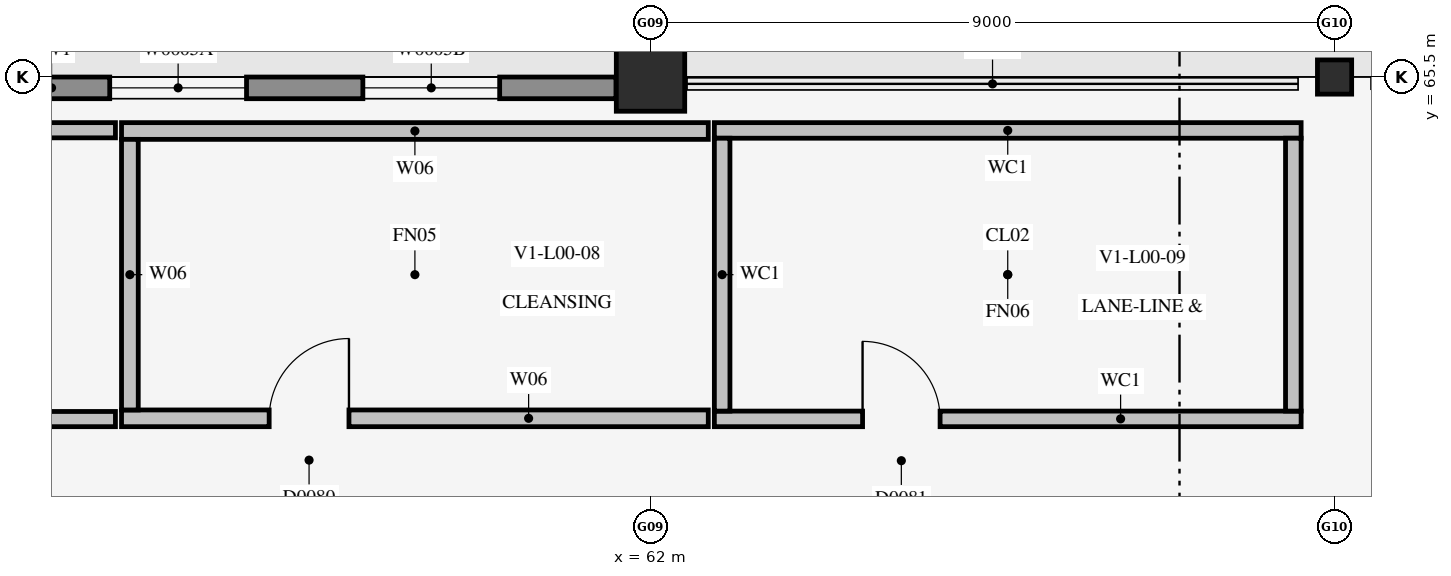
"""IFC4 building model, lengths in metres.
Left out: names, types, materials, properties, quantities, classifications, styles, units other than length and angle.
Written with IfcOpenShell. Run it as: python <this file> out.ifc"""

import sys

from ifc_helpers import new_model, si_unit, direction, frame, frame_2d, origin, origin_2d, place, context, subcontext, project, spatial, rectangle, circle, extrude, element, fill, save


model = new_model("IFC4")
c1 = context("Model", 3, precision=1e-05, world=origin(), true_north=direction((0.0, 1.0)))
c2 = subcontext(c1, "Body", "Model", "MODEL_VIEW")
j1 = project(units=[si_unit("LENGTHUNIT", "METRE"), si_unit("PLANEANGLEUNIT", "RADIAN")], contexts=[c1])
p1 = place(None, origin())
s1 = spatial("IfcSite", under=j1, at=p1, CompositionType="ELEMENT")
p2 = place(p1, origin())
s2 = spatial("IfcBuilding", under=s1, at=p2, CompositionType="ELEMENT")
p3 = place(p2, origin())
s3 = spatial("IfcBuildingStorey", under=s2, at=p3, CompositionType="ELEMENT", Elevation=0.0)
p4 = place(p3, frame((62.0, 65.5, 0.0), z_axis=(0.0, 0.0, 1.0), x_axis=(1.0, 0.0, 0.0)))
e1 = element("IfcColumn", 1, at=p4, inside=s3, PredefinedType="COLUMN", context=c2, shape_type="SweptSolid", body=[
    extrude(circle(Radius=0.45, at=origin_2d()), origin(), (0.0, 0.0, 1.0), 5.4),
])
p5 = place(p3, frame((71.0, 65.5, 0.0), z_axis=(0.0, 0.0, 1.0), x_axis=(1.0, 0.0, 0.0)))
e2 = element("IfcColumn", 2, at=p5, inside=s3, PredefinedType="COLUMN", context=c2, shape_type="SweptSolid", body=[
    extrude(rectangle(XDim=0.45, YDim=0.45, at=origin_2d()), origin(), (0.0, 0.0, 1.0), 5.4),
])
p6 = place(p3, frame((47.24, 61.0, 0.0), z_axis=(0.0, 0.0, 1.0), x_axis=(1.0, 0.0, 0.0)))
e3 = element("IfcWall", 3, at=p6, inside=s3, PredefinedType="PLUMBINGWALL", context=c2, shape_type="SweptSolid", body=[
    extrude(rectangle(XDim=7.72, YDim=0.2, at=frame_2d((3.86, 0.0))), origin(), (0.0, 0.0, 1.0), 5.125),
])
p7 = place(p6, frame((1.93, 0.0, 0.0)))
e4 = element("IfcOpeningElement", 4, at=p7, cuts=e3, PredefinedType="OPENING", context=c2, shape_type="SweptSolid", body=[
    extrude(rectangle(XDim=1.1, YDim=2.25, at=frame_2d((0.55, 1.125))), frame((0.0, 0.112, 0.0), z_axis=(0.0, -1.0, 0.0), x_axis=(1.0, 0.0, 0.0)), (0.0, 0.0, 1.0), 0.224),
])
p8 = place(p3, frame((47.24, 64.8, 0.0), z_axis=(0.0, 0.0, 1.0), x_axis=(1.0, 0.0, 0.0)))
e5 = element("IfcWall", 5, at=p8, inside=s3, PredefinedType="PLUMBINGWALL", context=c2, shape_type="SweptSolid", body=[
    extrude(rectangle(XDim=7.72, YDim=0.2, at=frame_2d((3.86, 0.0))), origin(), (0.0, 0.0, 1.0), 5.125),
])
p9 = place(p3, frame((55.04, 61.01, 0.0), z_axis=(0.0, 0.0, 1.0), x_axis=(1.0, 0.0, 0.0)))
e6 = element("IfcWall", 6, at=p9, inside=s3, PredefinedType="PLUMBINGWALL", context=c2, shape_type="SweptSolid", body=[
    extrude(rectangle(XDim=7.72, YDim=0.22, at=frame_2d((3.86, 0.0))), origin(), (0.0, 0.0, 1.0), 5.125),
])
p10 = place(p9, frame((1.942, 0.0, 0.0)))
e7 = element("IfcOpeningElement", 7, at=p10, cuts=e6, PredefinedType="OPENING", context=c2, shape_type="SweptSolid", body=[
    extrude(rectangle(XDim=1.05, YDim=2.15, at=frame_2d((0.525, 1.075))), frame((0.0, 0.122, 0.0), z_axis=(0.0, -1.0, 0.0), x_axis=(1.0, 0.0, 0.0)), (0.0, 0.0, 1.0), 0.244),
])
p11 = place(p3, frame((55.04, 64.79, 0.0), z_axis=(0.0, 0.0, 1.0), x_axis=(1.0, 0.0, 0.0)))
e8 = element("IfcWall", 8, at=p11, inside=s3, PredefinedType="PLUMBINGWALL", context=c2, shape_type="SweptSolid", body=[
    extrude(rectangle(XDim=7.72, YDim=0.22, at=frame_2d((3.86, 0.0))), origin(), (0.0, 0.0, 1.0), 5.125),
])
p12 = place(p3, frame((55.15, 61.12, 0.0), z_axis=(0.0, 0.0, 1.0), x_axis=(0.0, 1.0, 0.0)))
e9 = element("IfcWall", 9, at=p12, inside=s3, PredefinedType="PLUMBINGWALL", context=c2, shape_type="SweptSolid", body=[
    extrude(rectangle(XDim=3.56, YDim=0.22, at=frame_2d((1.78, 0.0))), origin(), (0.0, 0.0, 1.0), 5.125),
])
p13 = place(p3, frame((62.84, 61.002, 0.0), z_axis=(0.0, 0.0, 1.0), x_axis=(1.0, 0.0, 0.0)))
e10 = element("IfcWall", 10, at=p13, inside=s3, PredefinedType="SOLIDWALL", context=c2, shape_type="SweptSolid", body=[
    extrude(rectangle(XDim=7.72, YDim=0.205, at=frame_2d((3.86, 0.0))), origin(), (0.0, 0.0, 1.0), 5.125),
])
p14 = place(p13, frame((1.95, 0.0, 0.0)))
e11 = element("IfcOpeningElement", 11, at=p14, cuts=e10, PredefinedType="OPENING", context=c2, shape_type="SweptSolid", body=[
    extrude(rectangle(XDim=1.02, YDim=2.2, at=frame_2d((0.51, 1.1))), frame((0.0, 0.115, 0.0), z_axis=(0.0, -1.0, 0.0), x_axis=(1.0, 0.0, 0.0)), (0.0, 0.0, 1.0), 0.229),
])
p15 = place(p3, frame((62.84, 64.798, 0.0), z_axis=(0.0, 0.0, 1.0), x_axis=(1.0, 0.0, 0.0)))
e12 = element("IfcWall", 12, at=p15, inside=s3, PredefinedType="SOLIDWALL", context=c2, shape_type="SweptSolid", body=[
    extrude(rectangle(XDim=7.72, YDim=0.205, at=frame_2d((3.86, 0.0))), origin(), (0.0, 0.0, 1.0), 5.125),
])
for number, where, z_axis, x_axis in (
    (13, (70.458, 61.105, 0.0), (0.0, 0.0, 1.0), (0.0, 1.0, 0.0)),
    (14, (62.942, 61.105, 0.0), (0.0, 0.0, 1.0), (0.0, 1.0, 0.0)),
):
    element("IfcWall", number, at=place(p3, frame(where, z_axis=z_axis, x_axis=x_axis)), inside=s3, PredefinedType="SOLIDWALL", context=c2, shape_type="SweptSolid", body=[
        extrude(rectangle(XDim=3.59, YDim=0.205, at=frame_2d((1.795, 0.0))), origin(), (0.0, 0.0, 1.0), 5.125),
    ])
p16 = place(p3, frame((53.354, 65.357, 0.0), z_axis=(0.0, 0.0, 1.0), x_axis=(1.0, 0.0, 0.0)))
e15 = element("IfcWall", 15, at=p16, inside=s3, PredefinedType="SOLIDWALL", context=c2, shape_type="SweptSolid", body=[
    extrude(rectangle(XDim=8.192, YDim=0.285, at=frame_2d((4.096, 0.0))), origin(), (0.0, 0.0, 1.0), 4.765),
])
p17 = place(p16, frame((1.531, 0.0, 0.95)))
e16 = element("IfcOpeningElement", 16, at=p17, cuts=e15, PredefinedType="OPENING", context=c2, shape_type="SweptSolid", body=[
    extrude(rectangle(XDim=1.8, YDim=1.2, at=frame_2d((0.9, 0.6))), frame((0.0, 0.154, 0.0), z_axis=(0.0, -1.0, 0.0), x_axis=(1.0, 0.0, 0.0)), (0.0, 0.0, 1.0), 0.309),
])
p18 = place(p16, frame((4.861, 0.0, 0.95)))
e17 = element("IfcOpeningElement", 17, at=p18, cuts=e15, PredefinedType="OPENING", context=c2, shape_type="SweptSolid", body=[
    extrude(rectangle(XDim=1.8, YDim=1.2, at=frame_2d((0.9, 0.6))), frame((0.0, 0.154, 0.0), z_axis=(0.0, -1.0, 0.0), x_axis=(1.0, 0.0, 0.0)), (0.0, 0.0, 1.0), 0.309),
])
p19 = place(p10, origin())
e18 = element("IfcDoor", 18, at=p19, inside=s3, OperationType="SINGLE_SWING_RIGHT", PredefinedType="DOOR", context=c2, shape_type="SweptSolid", body=[
    extrude(rectangle(XDim=1.05, YDim=2.15, at=frame_2d((0.525, 1.075))), frame((0.0, 0.025, 0.0), z_axis=(0.0, -1.0, 0.0), x_axis=(1.0, 0.0, 0.0)), (0.0, 0.0, 1.0), 0.05),
])
fill(e7, e18)
p20 = place(p14, origin())
e19 = element("IfcDoor", 19, at=p20, inside=s3, OperationType="SINGLE_SWING_LEFT", PredefinedType="DOOR", context=c2, shape_type="SweptSolid", body=[
    extrude(rectangle(XDim=1.02, YDim=2.2, at=frame_2d((0.51, 1.1))), frame((0.0, 0.025, 0.0), z_axis=(0.0, -1.0, 0.0), x_axis=(1.0, 0.0, 0.0)), (0.0, 0.0, 1.0), 0.05),
])
fill(e11, e19)
p21 = place(p17, origin())
e20 = element("IfcWindow", 20, at=p21, inside=s3, PartitioningType="SINGLE_PANEL", PredefinedType="WINDOW", context=c2, shape_type="SweptSolid", body=[
    extrude(rectangle(XDim=1.8, YDim=1.2, at=frame_2d((0.9, 0.6))), frame((0.0, 0.03, 0.0), z_axis=(0.0, -1.0, 0.0), x_axis=(1.0, 0.0, 0.0)), (0.0, 0.0, 1.0), 0.06),
])
fill(e16, e20)
p22 = place(p18, origin())
e21 = element("IfcWindow", 21, at=p22, inside=s3, PartitioningType="SINGLE_PANEL", PredefinedType="WINDOW", context=c2, shape_type="SweptSolid", body=[
    extrude(rectangle(XDim=1.8, YDim=1.2, at=frame_2d((0.9, 0.6))), frame((0.0, 0.03, 0.0), z_axis=(0.0, -1.0, 0.0), x_axis=(1.0, 0.0, 0.0)), (0.0, 0.0, 1.0), 0.06),
])
fill(e17, e21)
save(model, sys.argv[1])
